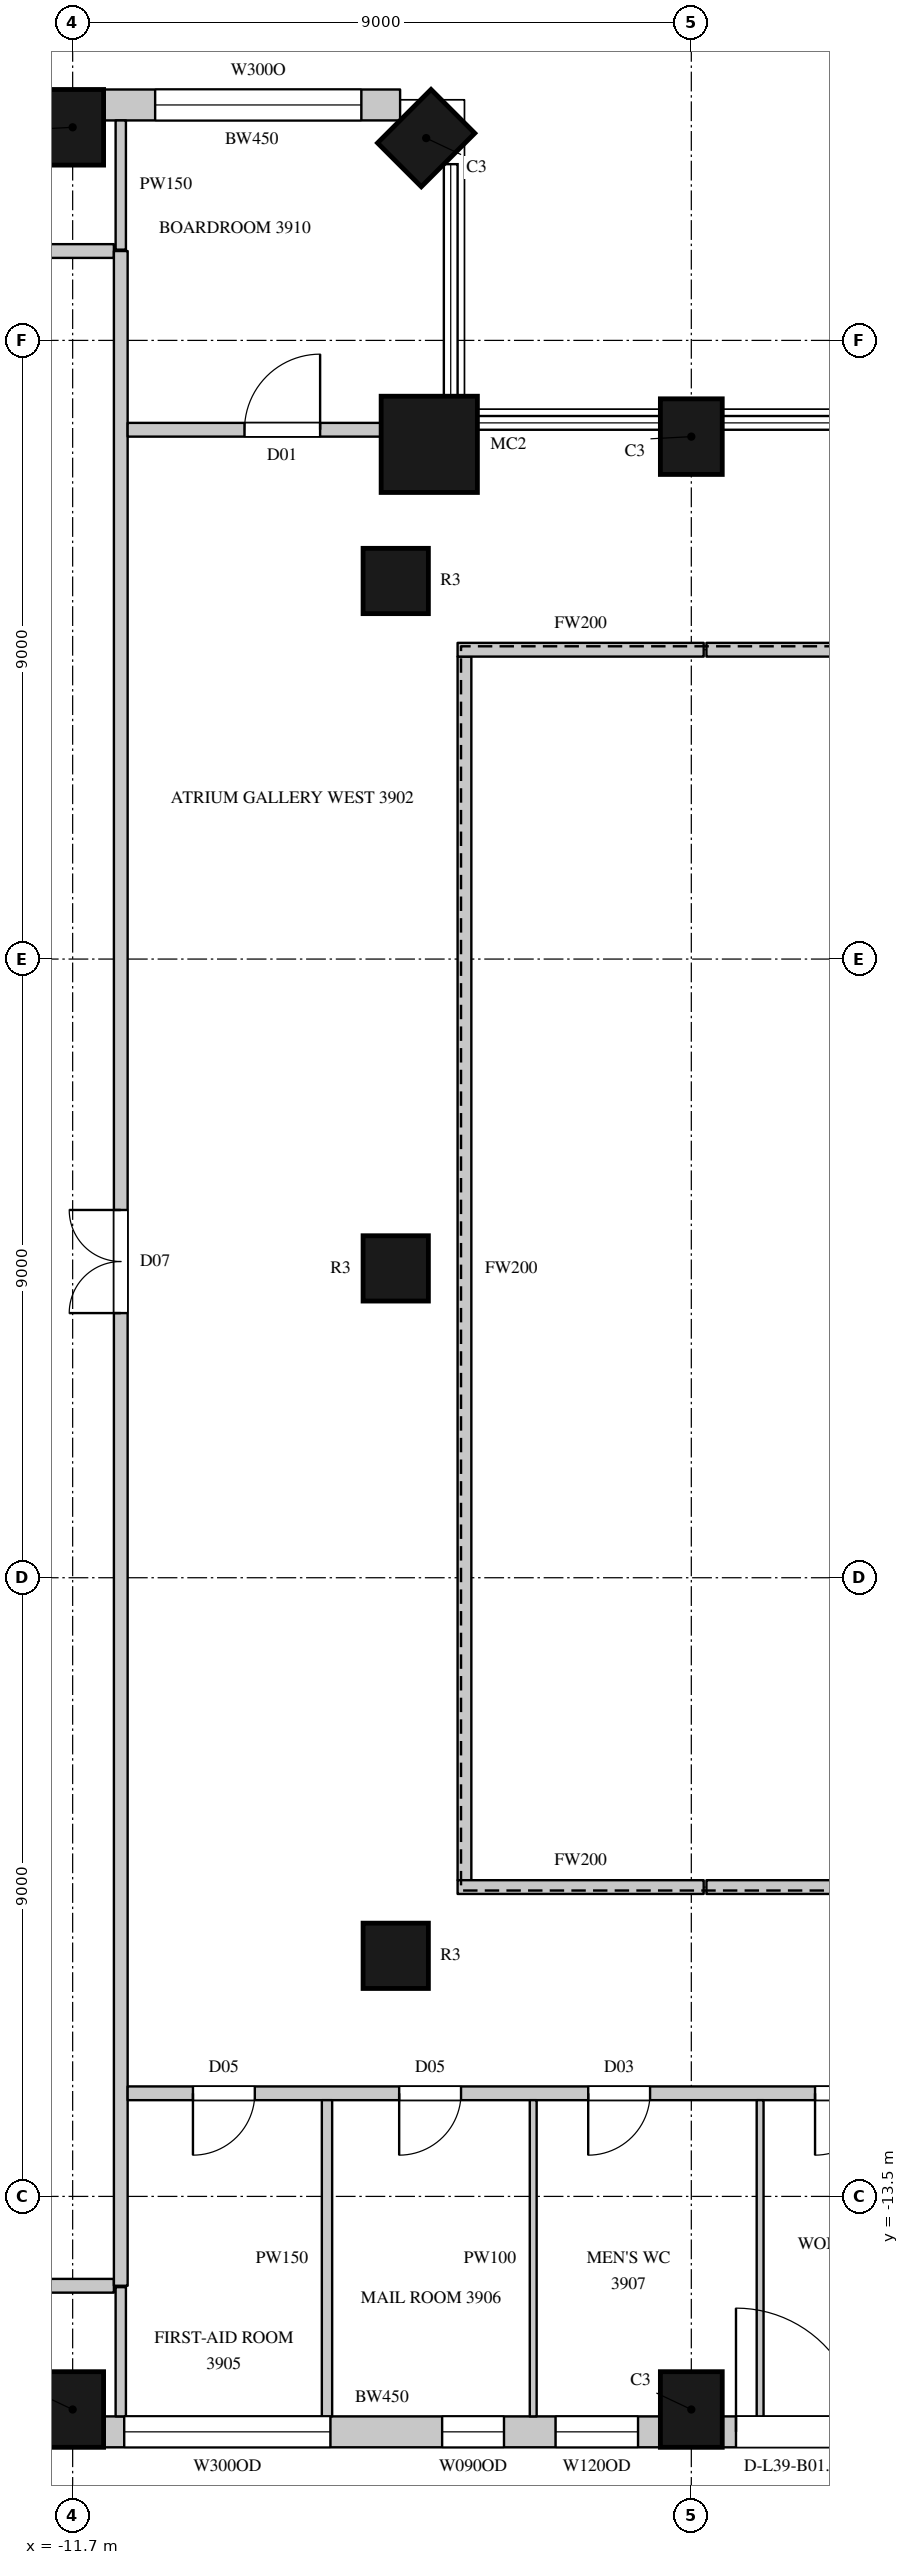
"""IFC4 building model, lengths in metres.
Left out: names, types, materials, properties, quantities, classifications, styles, units other than length and angle.
Written with IfcOpenShell. Run it as: python <this file> out.ifc"""

import sys

from ifc_helpers import new_model, si_unit, direction, frame, frame_2d, origin, origin_2d, place, context, subcontext, project, spatial, rectangle, circle, extrude, element, fill, save


model = new_model("IFC4")
c1 = context("Model", 3, precision=1e-05, world=origin(), true_north=direction((0.0, 1.0)))
c2 = subcontext(c1, "Body", "Model", "MODEL_VIEW")
j1 = project(units=[si_unit("LENGTHUNIT", "METRE"), si_unit("PLANEANGLEUNIT", "RADIAN")], contexts=[c1])
p1 = place(None, origin())
s1 = spatial("IfcSite", under=j1, at=p1, CompositionType="ELEMENT")
p2 = place(p1, origin())
s2 = spatial("IfcBuilding", under=s1, at=p2, CompositionType="ELEMENT")
p3 = place(p2, frame((0.0, 0.0, 181.0)))
s3 = spatial("IfcBuildingStorey", under=s2, at=p3, CompositionType="ELEMENT", Elevation=181.0)
for number, where, z_axis, x_axis in (
    (1, (-11.7, -16.6, 0.0), (0.0, 0.0, 1.0), (1.0, 0.0, 0.0)),
    (2, (-2.7, -16.6, 0.0), (0.0, 0.0, 1.0), (1.0, 0.0, 0.0)),
    (3, (-2.7, 12.1, 0.0), (0.0, 0.0, 1.0), (-1.0, 0.0, 0.0)),
):
    element("IfcColumn", number, at=place(p3, frame(where, z_axis=z_axis, x_axis=x_axis)), inside=s3, PredefinedType="COLUMN", context=c2, shape_type="SweptSolid", body=[
        extrude(rectangle(XDim=0.9, YDim=1.1, at=origin_2d()), origin(), (0.0, 0.0, 1.0), 4.1),
    ])
p4 = place(p3, frame((-6.512, 11.988, 0.0), z_axis=(0.0, 0.0, 1.0), x_axis=(1.0, 0.0, 0.0)))
e4 = element("IfcColumn", 4, at=p4, inside=s3, PredefinedType="COLUMN", context=c2, shape_type="SweptSolid", body=[
    extrude(circle(Radius=0.7, at=origin_2d()), origin(), (0.0, 0.0, 1.0), 4.1),
])
for number, where, z_axis, x_axis in (
    (5, (-6.557, 16.443, 0.0), (0.0, 0.0, 1.0), (-0.707, 0.707, 0.0)),
    (6, (-11.7, 16.6, 0.0), (0.0, 0.0, 1.0), (-1.0, 0.0, 0.0)),
):
    element("IfcColumn", number, at=place(p3, frame(where, z_axis=z_axis, x_axis=x_axis)), inside=s3, PredefinedType="COLUMN", context=c2, shape_type="SweptSolid", body=[
        extrude(rectangle(XDim=0.9, YDim=1.1, at=origin_2d()), origin(), (0.0, 0.0, 1.0), 4.1),
    ])
for number, where, z_axis, x_axis in (
    (7, (-7.0, -10.0, 0.0), (0.0, 0.0, 1.0), (1.0, 0.0, 0.0)),
    (8, (-7.0, 0.0, 0.0), (0.0, 0.0, 1.0), (1.0, 0.0, 0.0)),
    (9, (-7.0, 10.0, 0.0), (0.0, 0.0, 1.0), (1.0, 0.0, 0.0)),
):
    element("IfcColumn", number, at=place(p3, frame(where, z_axis=z_axis, x_axis=x_axis)), inside=s3, PredefinedType="COLUMN", context=c2, shape_type="SweptSolid", body=[
        extrude(circle(Radius=0.475, at=origin_2d()), origin(), (0.0, 0.0, 1.0), 4.1),
    ])
p5 = place(p3, frame((-11.25, -16.925, 0.0), z_axis=(0.0, 0.0, 1.0), x_axis=(1.0, 0.0, 0.0)))
e10 = element("IfcWall", 10, at=p5, inside=s3, PredefinedType="SOLIDWALL", context=c2, shape_type="SweptSolid", body=[
    extrude(rectangle(XDim=8.1, YDim=0.45, at=frame_2d((4.05, 0.0))), origin(), (0.0, 0.0, 1.0), 3.8),
])
p6 = place(p5, frame((0.3, 0.0, 1.05)))
e11 = element("IfcOpeningElement", 11, at=p6, cuts=e10, PredefinedType="OPENING", context=c2, shape_type="SweptSolid", body=[
    extrude(rectangle(XDim=3.0, YDim=2.4, at=frame_2d((1.5, 1.2))), frame((0.0, 0.235, 0.0), z_axis=(0.0, -1.0, 0.0), x_axis=(1.0, 0.0, 0.0)), (0.0, 0.0, 1.0), 0.47),
])
p7 = place(p5, frame((4.925, 0.0, 1.05)))
e12 = element("IfcOpeningElement", 12, at=p7, cuts=e10, PredefinedType="OPENING", context=c2, shape_type="SweptSolid", body=[
    extrude(rectangle(XDim=0.9, YDim=2.4, at=frame_2d((0.45, 1.2))), frame((0.0, 0.235, 0.0), z_axis=(0.0, -1.0, 0.0), x_axis=(1.0, 0.0, 0.0)), (0.0, 0.0, 1.0), 0.47),
])
p8 = place(p5, frame((6.575, 0.0, 1.05)))
e13 = element("IfcOpeningElement", 13, at=p8, cuts=e10, PredefinedType="OPENING", context=c2, shape_type="SweptSolid", body=[
    extrude(rectangle(XDim=1.2, YDim=2.4, at=frame_2d((0.6, 1.2))), frame((0.0, 0.235, 0.0), z_axis=(0.0, -1.0, 0.0), x_axis=(1.0, 0.0, 0.0)), (0.0, 0.0, 1.0), 0.47),
])
p9 = place(p3, frame((-2.25, -16.925, 0.0), z_axis=(0.0, 0.0, 1.0), x_axis=(1.0, 0.0, 0.0)))
e14 = element("IfcWall", 14, at=p9, inside=s3, PredefinedType="SOLIDWALL", context=c2, shape_type="SweptSolid", body=[
    extrude(rectangle(XDim=8.1, YDim=0.45, at=frame_2d((4.05, 0.0))), origin(), (0.0, 0.0, 1.0), 3.8),
])
p10 = place(p9, frame((0.2, 0.0, 0.0)))
e15 = element("IfcOpeningElement", 15, at=p10, cuts=e14, PredefinedType="OPENING", context=c2, shape_type="SweptSolid", body=[
    extrude(rectangle(XDim=1.8, YDim=2.4, at=frame_2d((0.9, 1.2))), frame((0.0, 0.235, 0.0), z_axis=(0.0, -1.0, 0.0), x_axis=(1.0, 0.0, 0.0)), (0.0, 0.0, 1.0), 0.47),
])
p11 = place(p9, frame((2.2, 0.0, 1.05)))
e16 = element("IfcOpeningElement", 16, at=p11, cuts=e14, PredefinedType="OPENING", context=c2, shape_type="SweptSolid", body=[
    extrude(rectangle(XDim=1.2, YDim=2.4, at=frame_2d((0.6, 1.2))), frame((0.0, 0.235, 0.0), z_axis=(0.0, -1.0, 0.0), x_axis=(1.0, 0.0, 0.0)), (0.0, 0.0, 1.0), 0.47),
])
p12 = place(p9, frame((4.926, 0.0, 1.05)))
e17 = element("IfcOpeningElement", 17, at=p12, cuts=e14, PredefinedType="OPENING", context=c2, shape_type="SweptSolid", body=[
    extrude(rectangle(XDim=1.5, YDim=2.4, at=frame_2d((0.75, 1.2))), frame((0.0, 0.235, 0.0), z_axis=(0.0, -1.0, 0.0), x_axis=(1.0, 0.0, 0.0)), (0.0, 0.0, 1.0), 0.47),
])
p13 = place(p9, frame((7.176, 0.0, 1.05)))
e18 = element("IfcOpeningElement", 18, at=p13, cuts=e14, PredefinedType="OPENING", context=c2, shape_type="SweptSolid", body=[
    extrude(rectangle(XDim=0.6, YDim=2.4, at=frame_2d((0.3, 1.2))), frame((0.0, 0.235, 0.0), z_axis=(0.0, -1.0, 0.0), x_axis=(1.0, 0.0, 0.0)), (0.0, 0.0, 1.0), 0.47),
])
p14 = place(p3, frame((-6.936, 16.925, 0.0), z_axis=(0.0, 0.0, 1.0), x_axis=(-1.0, 0.0, 0.0)))
e19 = element("IfcWall", 19, at=p14, inside=s3, PredefinedType="SOLIDWALL", context=c2, shape_type="SweptSolid", body=[
    extrude(rectangle(XDim=4.314, YDim=0.45, at=frame_2d((2.157, 0.0))), origin(), (0.0, 0.0, 1.0), 3.8),
])
p15 = place(p14, frame((0.564, 0.0, 1.05)))
e20 = element("IfcOpeningElement", 20, at=p15, cuts=e19, PredefinedType="OPENING", context=c2, shape_type="SweptSolid", body=[
    extrude(rectangle(XDim=3.0, YDim=2.4, at=frame_2d((1.5, 1.2))), frame((0.0, 0.235, 0.0), z_axis=(0.0, -1.0, 0.0), x_axis=(1.0, 0.0, 0.0)), (0.0, 0.0, 1.0), 0.47),
])
for number, where, z_axis, x_axis in (
    (21, (-13.97, -14.8, 0.0), (0.0, 0.0, 1.0), (1.0, 0.0, 0.0)),
    (22, (-13.97, 14.8, 0.0), (0.0, 0.0, 1.0), (1.0, 0.0, 0.0)),
):
    element("IfcWall", number, at=place(p3, frame(where, z_axis=z_axis, x_axis=x_axis)), inside=s3, PredefinedType="PARTITIONING", context=c2, shape_type="SweptSolid", body=[
        extrude(rectangle(XDim=2.87, YDim=0.2, at=frame_2d((1.435, 0.0))), origin(), (0.0, 0.0, 1.0), 3.8),
    ])
p16 = place(p3, frame((-11.0, -14.8, 0.0), z_axis=(0.0, 0.0, 1.0), x_axis=(0.0, 1.0, 0.0)))
e23 = element("IfcWall", 23, at=p16, inside=s3, PredefinedType="PARTITIONING", context=c2, shape_type="SweptSolid", body=[
    extrude(rectangle(XDim=29.6, YDim=0.2, at=frame_2d((14.8, 0.0))), origin(), (0.0, 0.0, 1.0), 3.8),
])
p17 = place(p16, frame((14.15, 0.0, 0.0)))
e24 = element("IfcOpeningElement", 24, at=p17, cuts=e23, PredefinedType="OPENING", context=c2, shape_type="SweptSolid", body=[
    extrude(rectangle(XDim=1.5, YDim=2.4, at=frame_2d((0.75, 1.2))), frame((0.0, 0.11, 0.0), z_axis=(0.0, -1.0, 0.0), x_axis=(1.0, 0.0, 0.0)), (0.0, 0.0, 1.0), 0.22),
])
p18 = place(p3, frame((-10.9, -12.0, 0.0), z_axis=(0.0, 0.0, 1.0), x_axis=(1.0, 0.0, 0.0)))
e25 = element("IfcWall", 25, at=p18, inside=s3, PredefinedType="PARTITIONING", context=c2, shape_type="SweptSolid", body=[
    extrude(rectangle(XDim=21.8, YDim=0.2, at=frame_2d((10.9, 0.0))), origin(), (0.0, 0.0, 1.0), 3.8),
])
p19 = place(p18, frame((0.95, 0.0, 0.0)))
e26 = element("IfcOpeningElement", 26, at=p19, cuts=e25, PredefinedType="OPENING", context=c2, shape_type="SweptSolid", body=[
    extrude(rectangle(XDim=0.9, YDim=2.2, at=frame_2d((0.45, 1.1))), frame((0.0, 0.11, 0.0), z_axis=(0.0, -1.0, 0.0), x_axis=(1.0, 0.0, 0.0)), (0.0, 0.0, 1.0), 0.22),
])
p20 = place(p18, frame((3.95, 0.0, 0.0)))
e27 = element("IfcOpeningElement", 27, at=p20, cuts=e25, PredefinedType="OPENING", context=c2, shape_type="SweptSolid", body=[
    extrude(rectangle(XDim=0.9, YDim=2.2, at=frame_2d((0.45, 1.1))), frame((0.0, 0.11, 0.0), z_axis=(0.0, -1.0, 0.0), x_axis=(1.0, 0.0, 0.0)), (0.0, 0.0, 1.0), 0.22),
])
p21 = place(p18, frame((6.7, 0.0, 0.0)))
e28 = element("IfcOpeningElement", 28, at=p21, cuts=e25, PredefinedType="OPENING", context=c2, shape_type="SweptSolid", body=[
    extrude(rectangle(XDim=0.9, YDim=2.2, at=frame_2d((0.45, 1.1))), frame((0.0, 0.11, 0.0), z_axis=(0.0, -1.0, 0.0), x_axis=(1.0, 0.0, 0.0)), (0.0, 0.0, 1.0), 0.22),
])
p22 = place(p18, frame((10.0, 0.0, 0.0)))
e29 = element("IfcOpeningElement", 29, at=p22, cuts=e25, PredefinedType="OPENING", context=c2, shape_type="SweptSolid", body=[
    extrude(rectangle(XDim=0.9, YDim=2.2, at=frame_2d((0.45, 1.1))), frame((0.0, 0.11, 0.0), z_axis=(0.0, -1.0, 0.0), x_axis=(1.0, 0.0, 0.0)), (0.0, 0.0, 1.0), 0.22),
])
p23 = place(p18, frame((13.55, 0.0, 0.0)))
e30 = element("IfcOpeningElement", 30, at=p23, cuts=e25, PredefinedType="OPENING", context=c2, shape_type="SweptSolid", body=[
    extrude(rectangle(XDim=0.9, YDim=2.2, at=frame_2d((0.45, 1.1))), frame((0.0, 0.11, 0.0), z_axis=(0.0, -1.0, 0.0), x_axis=(1.0, 0.0, 0.0)), (0.0, 0.0, 1.0), 0.22),
])
p24 = place(p18, frame((15.8, 0.0, 0.0)))
e31 = element("IfcOpeningElement", 31, at=p24, cuts=e25, PredefinedType="OPENING", context=c2, shape_type="SweptSolid", body=[
    extrude(rectangle(XDim=1.1, YDim=2.4, at=frame_2d((0.55, 1.2))), frame((0.0, 0.11, 0.0), z_axis=(0.0, -1.0, 0.0), x_axis=(1.0, 0.0, 0.0)), (0.0, 0.0, 1.0), 0.22),
])
p25 = place(p18, frame((18.0, 0.0, 0.0)))
e32 = element("IfcOpeningElement", 32, at=p25, cuts=e25, PredefinedType="OPENING", context=c2, shape_type="SweptSolid", body=[
    extrude(rectangle(XDim=1.1, YDim=2.4, at=frame_2d((0.55, 1.2))), frame((0.0, 0.11, 0.0), z_axis=(0.0, -1.0, 0.0), x_axis=(1.0, 0.0, 0.0)), (0.0, 0.0, 1.0), 0.22),
])
p26 = place(p3, frame((-10.9, 12.2, 0.0), z_axis=(0.0, 0.0, 1.0), x_axis=(1.0, 0.0, 0.0)))
e33 = element("IfcWall", 33, at=p26, inside=s3, PredefinedType="PARTITIONING", context=c2, shape_type="SweptSolid", body=[
    extrude(rectangle(XDim=3.704, YDim=0.2, at=frame_2d((1.852, 0.0))), origin(), (0.0, 0.0, 1.0), 3.8),
])
p27 = place(p26, frame((1.7, 0.0, 0.0)))
e34 = element("IfcOpeningElement", 34, at=p27, cuts=e33, PredefinedType="OPENING", context=c2, shape_type="SweptSolid", body=[
    extrude(rectangle(XDim=1.1, YDim=2.4, at=frame_2d((0.55, 1.2))), frame((0.0, 0.11, 0.0), z_axis=(0.0, -1.0, 0.0), x_axis=(1.0, 0.0, 0.0)), (0.0, 0.0, 1.0), 0.22),
])
p28 = place(p3, frame((-6.0, -8.9, 0.0), z_axis=(0.0, 0.0, 1.0), x_axis=(0.0, 1.0, 0.0)))
e35 = element("IfcWall", 35, at=p28, inside=s3, PredefinedType="PARTITIONING", context=c2, shape_type="SweptSolid", body=[
    extrude(rectangle(XDim=17.8, YDim=0.2, at=frame_2d((8.9, 0.0))), origin(), (0.0, 0.0, 1.0), 3.8),
])
for number, where, z_axis, x_axis in (
    (36, (-6.1, -9.0, 0.0), (0.0, 0.0, 1.0), (1.0, 0.0, 0.0)),
    (37, (-6.1, 9.0, 0.0), (0.0, 0.0, 1.0), (1.0, 0.0, 0.0)),
):
    element("IfcWall", number, at=place(p3, frame(where, z_axis=z_axis, x_axis=x_axis)), inside=s3, PredefinedType="PARTITIONING", context=c2, shape_type="SweptSolid", body=[
        extrude(rectangle(XDim=3.58, YDim=0.2, at=frame_2d((1.79, 0.0))), origin(), (0.0, 0.0, 1.0), 3.8),
    ])
for number, where, z_axis, x_axis in (
    (38, (-2.48, -9.0, 0.0), (0.0, 0.0, 1.0), (1.0, 0.0, 0.0)),
    (39, (-2.48, 9.0, 0.0), (0.0, 0.0, 1.0), (1.0, 0.0, 0.0)),
):
    element("IfcWall", number, at=place(p3, frame(where, z_axis=z_axis, x_axis=x_axis)), inside=s3, PredefinedType="PARTITIONING", context=c2, shape_type="SweptSolid", body=[
        extrude(rectangle(XDim=10.58, YDim=0.2, at=frame_2d((5.29, 0.0))), origin(), (0.0, 0.0, 1.0), 3.8),
    ])
for number, where, z_axis, x_axis in (
    (40, (-11.0, -16.7, 0.0), (0.0, 0.0, 1.0), (0.0, 1.0, 0.0)),
    (41, (-11.0, 14.82, 0.0), (0.0, 0.0, 1.0), (0.0, 1.0, 0.0)),
):
    element("IfcWall", number, at=place(p3, frame(where, z_axis=z_axis, x_axis=x_axis)), inside=s3, PredefinedType="PARTITIONING", context=c2, shape_type="SweptSolid", body=[
        extrude(rectangle(XDim=1.88, YDim=0.15, at=frame_2d((0.94, 0.0))), origin(), (0.0, 0.0, 1.0), 3.8),
    ])
p29 = place(p3, frame((-8.0, -16.7, 0.0), z_axis=(0.0, 0.0, 1.0), x_axis=(0.0, 1.0, 0.0)))
e42 = element("IfcWall", 42, at=p29, inside=s3, PredefinedType="PARTITIONING", context=c2, shape_type="SweptSolid", body=[
    extrude(rectangle(XDim=4.6, YDim=0.15, at=frame_2d((2.3, 0.0))), origin(), (0.0, 0.0, 1.0), 3.8),
])
for number, where, z_axis, x_axis in (
    (43, (-5.0, -16.7, 0.0), (0.0, 0.0, 1.0), (0.0, 1.0, 0.0)),
    (44, (-1.699, -16.7, 0.0), (0.0, 0.0, 1.0), (0.0, 1.0, 0.0)),
):
    element("IfcWall", number, at=place(p3, frame(where, z_axis=z_axis, x_axis=x_axis)), inside=s3, PredefinedType="PARTITIONING", context=c2, shape_type="SweptSolid", body=[
        extrude(rectangle(XDim=4.6, YDim=0.1, at=frame_2d((2.3, 0.0))), origin(), (0.0, 0.0, 1.0), 3.8),
    ])
p30 = place(p6, origin())
e45 = element("IfcWindow", 45, at=p30, inside=s3, PartitioningType="SINGLE_PANEL", PredefinedType="WINDOW", context=c2, shape_type="SweptSolid", body=[
    extrude(rectangle(XDim=3.0, YDim=2.4, at=frame_2d((1.5, 1.2))), frame((0.0, 0.135, 0.0), z_axis=(0.0, -1.0, 0.0), x_axis=(1.0, 0.0, 0.0)), (0.0, 0.0, 1.0), 0.06),
])
fill(e11, e45)
p31 = place(p10, origin())
e46 = element("IfcDoor", 46, at=p31, inside=s3, OperationType="SLIDING_TO_LEFT", PredefinedType="DOOR", context=c2, shape_type="SweptSolid", body=[
    extrude(rectangle(XDim=1.8, YDim=2.4, at=frame_2d((0.9, 1.2))), frame((0.0, 0.13, 0.0), z_axis=(0.0, -1.0, 0.0), x_axis=(1.0, 0.0, 0.0)), (0.0, 0.0, 1.0), 0.05),
])
fill(e15, e46)
p32 = place(p15, origin())
e47 = element("IfcWindow", 47, at=p32, inside=s3, PartitioningType="SINGLE_PANEL", PredefinedType="WINDOW", context=c2, shape_type="SweptSolid", body=[
    extrude(rectangle(XDim=3.0, YDim=2.4, at=frame_2d((1.5, 1.2))), frame((0.0, 0.135, 0.0), z_axis=(0.0, -1.0, 0.0), x_axis=(1.0, 0.0, 0.0)), (0.0, 0.0, 1.0), 0.06),
])
fill(e20, e47)
p33 = place(p17, origin())
e48 = element("IfcDoor", 48, at=p33, inside=s3, OperationType="DOUBLE_DOOR_SINGLE_SWING", PredefinedType="DOOR", context=c2, shape_type="SweptSolid", body=[
    extrude(rectangle(XDim=1.5, YDim=2.4, at=frame_2d((0.75, 1.2))), frame((0.0, 0.025, 0.0), z_axis=(0.0, -1.0, 0.0), x_axis=(1.0, 0.0, 0.0)), (0.0, 0.0, 1.0), 0.05),
])
fill(e24, e48)
p34 = place(p19, origin())
e49 = element("IfcDoor", 49, at=p34, inside=s3, OperationType="SINGLE_SWING_RIGHT", PredefinedType="DOOR", context=c2, shape_type="SweptSolid", body=[
    extrude(rectangle(XDim=0.9, YDim=2.2, at=frame_2d((0.45, 1.1))), frame((0.0, 0.025, 0.0), z_axis=(0.0, -1.0, 0.0), x_axis=(1.0, 0.0, 0.0)), (0.0, 0.0, 1.0), 0.05),
])
fill(e26, e49)
p35 = place(p20, origin())
e50 = element("IfcDoor", 50, at=p35, inside=s3, OperationType="SINGLE_SWING_RIGHT", PredefinedType="DOOR", context=c2, shape_type="SweptSolid", body=[
    extrude(rectangle(XDim=0.9, YDim=2.2, at=frame_2d((0.45, 1.1))), frame((0.0, 0.025, 0.0), z_axis=(0.0, -1.0, 0.0), x_axis=(1.0, 0.0, 0.0)), (0.0, 0.0, 1.0), 0.05),
])
fill(e27, e50)
p36 = place(p21, origin())
e51 = element("IfcDoor", 51, at=p36, inside=s3, OperationType="SINGLE_SWING_RIGHT", PredefinedType="DOOR", context=c2, shape_type="SweptSolid", body=[
    extrude(rectangle(XDim=0.9, YDim=2.2, at=frame_2d((0.45, 1.1))), frame((0.0, 0.025, 0.0), z_axis=(0.0, -1.0, 0.0), x_axis=(1.0, 0.0, 0.0)), (0.0, 0.0, 1.0), 0.05),
])
fill(e28, e51)
p37 = place(p22, origin())
e52 = element("IfcDoor", 52, at=p37, inside=s3, OperationType="SINGLE_SWING_RIGHT", PredefinedType="DOOR", context=c2, shape_type="SweptSolid", body=[
    extrude(rectangle(XDim=0.9, YDim=2.2, at=frame_2d((0.45, 1.1))), frame((0.0, 0.025, 0.0), z_axis=(0.0, -1.0, 0.0), x_axis=(1.0, 0.0, 0.0)), (0.0, 0.0, 1.0), 0.05),
])
fill(e29, e52)
p38 = place(p27, origin())
e53 = element("IfcDoor", 53, at=p38, inside=s3, OperationType="SINGLE_SWING_RIGHT", PredefinedType="DOOR", context=c2, shape_type="SweptSolid", body=[
    extrude(rectangle(XDim=1.1, YDim=2.4, at=frame_2d((0.55, 1.2))), frame((0.0, 0.025, 0.0), z_axis=(0.0, -1.0, 0.0), x_axis=(1.0, 0.0, 0.0)), (0.0, 0.0, 1.0), 0.05),
])
fill(e34, e53)
p39 = place(p7, origin())
e54 = element("IfcWindow", 54, at=p39, inside=s3, PartitioningType="SINGLE_PANEL", PredefinedType="WINDOW", context=c2, shape_type="SweptSolid", body=[
    extrude(rectangle(XDim=0.9, YDim=2.4, at=frame_2d((0.45, 1.2))), frame((0.0, 0.135, 0.0), z_axis=(0.0, -1.0, 0.0), x_axis=(1.0, 0.0, 0.0)), (0.0, 0.0, 1.0), 0.06),
])
fill(e12, e54)
p40 = place(p8, origin())
e55 = element("IfcWindow", 55, at=p40, inside=s3, PartitioningType="SINGLE_PANEL", PredefinedType="WINDOW", context=c2, shape_type="SweptSolid", body=[
    extrude(rectangle(XDim=1.2, YDim=2.4, at=frame_2d((0.6, 1.2))), frame((0.0, 0.135, 0.0), z_axis=(0.0, -1.0, 0.0), x_axis=(1.0, 0.0, 0.0)), (0.0, 0.0, 1.0), 0.06),
])
fill(e13, e55)
save(model, sys.argv[1])
